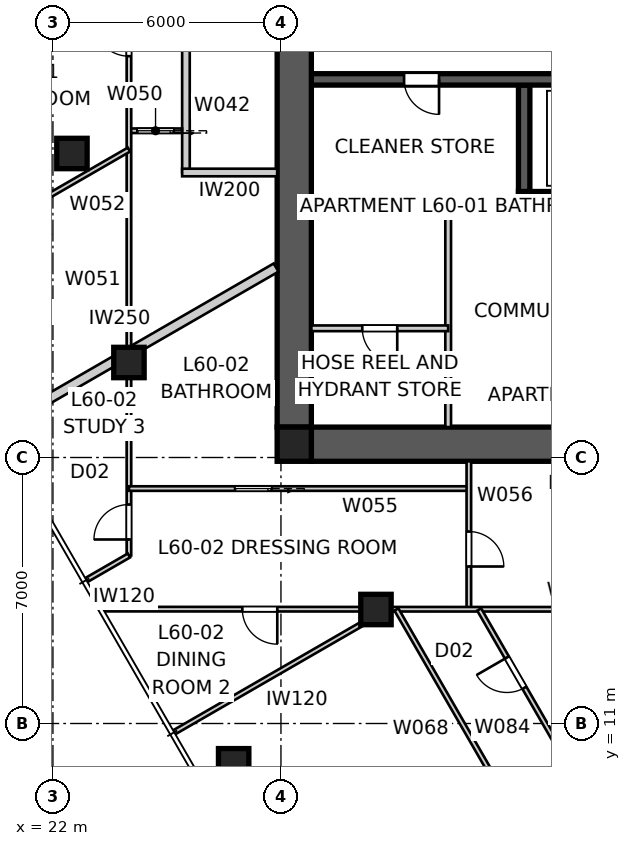
"""IFC4 building model, lengths in metres.
Left out: names, types, materials, properties, quantities, classifications, styles, units other than length and angle.
Written with IfcOpenShell. Run it as: python <this file> out.ifc"""

import sys

from ifc_helpers import new_model, si_unit, direction, frame, frame_2d, origin, origin_2d, place, context, subcontext, project, spatial, polyline, rectangle, outline, extrude, element, fill, save


model = new_model("IFC4")
c1 = context("Model", 3, precision=1e-05, world=origin(), true_north=direction((0.0, 1.0)))
c2 = subcontext(c1, "Body", "Model", "MODEL_VIEW")
j1 = project(units=[si_unit("LENGTHUNIT", "METRE"), si_unit("PLANEANGLEUNIT", "RADIAN")], contexts=[c1])
p1 = place(None, origin())
s1 = spatial("IfcSite", under=j1, at=p1, CompositionType="ELEMENT")
p2 = place(p1, origin())
s2 = spatial("IfcBuilding", under=s1, at=p2, CompositionType="ELEMENT")
p3 = place(p2, frame((0.0, 0.0, 218.4)))
s3 = spatial("IfcBuildingStorey", under=s2, at=p3, CompositionType="ELEMENT", Elevation=218.4)
p4 = place(p3, frame((51.2, 18.35, 0.0), z_axis=(0.0, 0.0, 1.0), x_axis=(-1.0, 0.0, 0.0)))
e1 = element("IfcWall", 1, at=p4, inside=s3, PredefinedType="SHEAR", context=c2, shape_type="SweptSolid", body=[
    extrude(outline(polyline([(0.0, -0.45), (22.4, -0.45), (22.4, -0.025), (22.85, -0.025), (22.85, 0.025), (22.4, 0.025), (22.4, 0.45), (0.0, 0.45), (0.0, 0.025), (-0.45, 0.025), (-0.45, -0.025), (0.0, -0.025), (0.0, -0.45)])), origin(), (0.0, 0.0, 1.0), 3.4),
])
p5 = place(p3, frame((28.35, 41.2, 0.0), z_axis=(0.0, 0.0, 1.0), x_axis=(0.0, -1.0, 0.0)))
e2 = element("IfcWall", 2, at=p5, inside=s3, PredefinedType="SHEAR", context=c2, shape_type="SweptSolid", body=[
    extrude(outline(polyline([(0.0, -0.45), (22.4, -0.45), (22.4, -0.025), (22.85, -0.025), (22.85, 0.025), (22.4, 0.025), (22.4, 0.45), (0.0, 0.45), (0.0, 0.025), (-0.45, 0.025), (-0.45, -0.025), (0.0, -0.025), (0.0, -0.45)])), origin(), (0.0, 0.0, 1.0), 3.4),
])
p6 = place(p5, frame((11.14, 0.0, 0.0)))
e3 = element("IfcOpeningElement", 3, at=p6, cuts=e2, PredefinedType="OPENING", context=c2, shape_type="SweptSolid", body=[
    extrude(rectangle(XDim=1.02, YDim=2.4, at=frame_2d((0.51, 1.2))), frame((0.0, 0.46, 0.0), z_axis=(0.0, -1.0, 0.0), x_axis=(1.0, 0.0, 0.0)), (0.0, 0.0, 1.0), 0.92),
])
p7 = place(p3, frame((51.2, 27.95, 0.0), z_axis=(0.0, 0.0, 1.0), x_axis=(-1.0, 0.0, 0.0)))
e4 = element("IfcWall", 4, at=p7, inside=s3, PredefinedType="SHEAR", context=c2, shape_type="SweptSolid", body=[
    extrude(rectangle(XDim=22.4, YDim=0.3, at=frame_2d((11.2, 0.0))), origin(), (0.0, 0.0, 1.0), 3.4),
])
p8 = place(p7, frame((19.04, 0.0, 0.0)))
e5 = element("IfcOpeningElement", 5, at=p8, cuts=e4, PredefinedType="OPENING", context=c2, shape_type="SweptSolid", body=[
    extrude(rectangle(XDim=0.92, YDim=2.1, at=frame_2d((0.46, 1.05))), frame((0.0, 0.16, 0.0), z_axis=(0.0, -1.0, 0.0), x_axis=(1.0, 0.0, 0.0)), (0.0, 0.0, 1.0), 0.32),
])
p9 = place(p7, frame((1.265, 0.0, 0.0)))
e6 = element("IfcOpeningElement", 6, at=p9, cuts=e4, PredefinedType="OPENING", context=c2, shape_type="SweptSolid", body=[
    extrude(rectangle(XDim=1.02, YDim=2.1, at=frame_2d((0.51, 1.05))), frame((0.0, 0.16, 0.0), z_axis=(0.0, -1.0, 0.0), x_axis=(1.0, 0.0, 0.0)), (0.0, 0.0, 1.0), 0.32),
])
p10 = place(p7, frame((4.015, 0.0, 0.0)))
e7 = element("IfcOpeningElement", 7, at=p10, cuts=e4, PredefinedType="OPENING", context=c2, shape_type="SweptSolid", body=[
    extrude(rectangle(XDim=0.92, YDim=2.1, at=frame_2d((0.46, 1.05))), frame((0.0, 0.16, 0.0), z_axis=(0.0, -1.0, 0.0), x_axis=(1.0, 0.0, 0.0)), (0.0, 0.0, 1.0), 0.32),
])
p11 = place(p7, frame((8.89, 0.0, 0.0)))
e8 = element("IfcOpeningElement", 8, at=p11, cuts=e4, PredefinedType="OPENING", context=c2, shape_type="SweptSolid", body=[
    extrude(rectangle(XDim=0.92, YDim=2.1, at=frame_2d((0.46, 1.05))), frame((0.0, 0.16, 0.0), z_axis=(0.0, -1.0, 0.0), x_axis=(1.0, 0.0, 0.0)), (0.0, 0.0, 1.0), 0.32),
])
p12 = place(p7, frame((6.565, 0.0, 0.0)))
e9 = element("IfcOpeningElement", 9, at=p12, cuts=e4, PredefinedType="OPENING", context=c2, shape_type="SweptSolid", body=[
    extrude(rectangle(XDim=0.92, YDim=2.1, at=frame_2d((0.46, 1.05))), frame((0.0, 0.16, 0.0), z_axis=(0.0, -1.0, 0.0), x_axis=(1.0, 0.0, 0.0)), (0.0, 0.0, 1.0), 0.32),
])
p13 = place(p7, frame((12.05, 0.0, 0.0)))
e10 = element("IfcOpeningElement", 10, at=p13, cuts=e4, PredefinedType="OPENING", context=c2, shape_type="SweptSolid", body=[
    extrude(rectangle(XDim=1.1, YDim=2.1, at=frame_2d((0.55, 1.05))), frame((0.0, 0.16, 0.0), z_axis=(0.0, -1.0, 0.0), x_axis=(1.0, 0.0, 0.0)), (0.0, 0.0, 1.0), 0.32),
])
p14 = place(p7, frame((14.85, 0.0, 0.0)))
e11 = element("IfcOpeningElement", 11, at=p14, cuts=e4, PredefinedType="OPENING", context=c2, shape_type="SweptSolid", body=[
    extrude(rectangle(XDim=1.1, YDim=2.1, at=frame_2d((0.55, 1.05))), frame((0.0, 0.16, 0.0), z_axis=(0.0, -1.0, 0.0), x_axis=(1.0, 0.0, 0.0)), (0.0, 0.0, 1.0), 0.32),
])
p15 = place(p3, frame((45.75, 24.85, 0.0), z_axis=(0.0, 0.0, 1.0), x_axis=(-1.0, 0.0, 0.0)))
e12 = element("IfcWall", 12, at=p15, inside=s3, PredefinedType="SHEAR", context=c2, shape_type="SweptSolid", body=[
    extrude(rectangle(XDim=11.5, YDim=0.3, at=frame_2d((5.75, 0.0))), origin(), (0.0, 0.0, 1.0), 3.4),
])
p16 = place(p3, frame((34.4, 27.8, 0.0), z_axis=(0.0, 0.0, 1.0), x_axis=(0.0, -1.0, 0.0)))
e13 = element("IfcWall", 13, at=p16, inside=s3, PredefinedType="SHEAR", context=c2, shape_type="SweptSolid", body=[
    extrude(rectangle(XDim=2.8, YDim=0.3, at=frame_2d((1.4, 0.0))), origin(), (0.0, 0.0, 1.0), 3.4),
])
p17 = place(p3, frame((28.35, 18.35, 0.0), z_axis=(0.0, 0.0, 1.0), x_axis=(1.0, 0.0, 0.0)))
e14 = element("IfcColumn", 14, at=p17, inside=s3, PredefinedType="COLUMN", context=c2, shape_type="SweptSolid", body=[
    extrude(rectangle(XDim=0.9, YDim=0.9, at=origin_2d()), origin(), (0.0, 0.0, 1.0), 3.4),
])
for number, where, z_axis, x_axis in (
    (15, (26.755, 9.94, 0.0), (0.0, 0.0, 1.0), (1.0, 0.0, 0.0)),
    (16, (22.5, 26.0, 0.0), (0.0, 0.0, 1.0), (1.0, 0.0, 0.0)),
    (17, (24.0, 20.5, 0.0), (0.0, 0.0, 1.0), (1.0, 0.0, 0.0)),
    (18, (30.5, 14.0, 0.0), (0.0, 0.0, 1.0), (1.0, 0.0, 0.0)),
):
    element("IfcColumn", number, at=place(p3, frame(where, z_axis=z_axis, x_axis=x_axis)), inside=s3, PredefinedType="COLUMN", context=c2, shape_type="SweptSolid", body=[
        extrude(rectangle(XDim=0.8, YDim=0.8, at=origin_2d()), origin(), (0.0, 0.0, 1.0), 3.4),
    ])
p18 = place(p3, frame((25.5, 25.5, 0.0), z_axis=(0.0, 0.0, 1.0), x_axis=(0.0, 1.0, 0.0)))
e19 = element("IfcWall", 19, at=p18, inside=s3, PredefinedType="PARTITIONING", context=c2, shape_type="SweptSolid", body=[
    extrude(rectangle(XDim=9.0, YDim=0.2, at=frame_2d((4.5, 0.0))), origin(), (0.0, 0.0, 1.0), 3.25),
])
p19 = place(p18, frame((3.492, 0.0, 0.0)))
e20 = element("IfcOpeningElement", 20, at=p19, cuts=e19, PredefinedType="OPENING", context=c2, shape_type="SweptSolid", body=[
    extrude(rectangle(XDim=1.02, YDim=2.34, at=frame_2d((0.51, 1.17))), frame((0.0, 0.11, 0.0), z_axis=(0.0, -1.0, 0.0), x_axis=(1.0, 0.0, 0.0)), (0.0, 0.0, 1.0), 0.22),
])
p20 = place(p18, frame((7.229, 0.0, 0.0)))
e21 = element("IfcOpeningElement", 21, at=p20, cuts=e19, PredefinedType="OPENING", context=c2, shape_type="SweptSolid", body=[
    extrude(rectangle(XDim=1.02, YDim=2.34, at=frame_2d((0.51, 1.17))), frame((0.0, 0.11, 0.0), z_axis=(0.0, -1.0, 0.0), x_axis=(1.0, 0.0, 0.0)), (0.0, 0.0, 1.0), 0.22),
])
p21 = place(p3, frame((27.9, 25.5, 0.0), z_axis=(0.0, 0.0, 1.0), x_axis=(-1.0, 0.0, 0.0)))
e22 = element("IfcWall", 22, at=p21, inside=s3, PredefinedType="PARTITIONING", context=c2, shape_type="SweptSolid", body=[
    extrude(rectangle(XDim=2.5, YDim=0.2, at=frame_2d((1.25, 0.0))), origin(), (0.0, 0.0, 1.0), 3.25),
])
p22 = place(p3, frame((15.889, 26.761, 0.0), z_axis=(0.0, 0.0, 1.0), x_axis=(0.866024069551, 0.500002310952, 0.0)))
e23 = element("IfcWall", 23, at=p22, inside=s3, PredefinedType="PARTITIONING", context=c2, shape_type="SweptSolid", body=[
    extrude(rectangle(XDim=10.95, YDim=0.25, at=frame_2d((5.475, 0.0))), origin(), (0.0, 0.0, 1.0), 3.25),
])
p23 = place(p3, frame((20.514, 18.75, 0.0), z_axis=(0.0, 0.0, 1.0), x_axis=(0.866020489494, 0.500008511703, 0.0)))
e24 = element("IfcWall", 24, at=p23, inside=s3, PredefinedType="PARTITIONING", context=c2, shape_type="SweptSolid", body=[
    extrude(rectangle(XDim=8.496, YDim=0.25, at=frame_2d((4.248, 0.0))), origin(), (0.0, 0.0, 1.0), 3.25),
])
p24 = place(p3, frame((32.4, 18.8, 0.0), z_axis=(0.0, 0.0, 1.0), x_axis=(0.0, 1.0, 0.0)))
e25 = element("IfcWall", 25, at=p24, inside=s3, PredefinedType="SOLIDWALL", context=c2, shape_type="SweptSolid", body=[
    extrude(rectangle(XDim=5.9, YDim=0.15, at=frame_2d((2.95, 0.0))), origin(), (0.0, 0.0, 1.0), 3.25),
])
p25 = place(p3, frame((32.4, 24.7, 0.0), z_axis=(0.0, 0.0, 1.0), x_axis=(1.0, 0.0, 0.0)))
e26 = element("IfcWall", 26, at=p25, inside=s3, PredefinedType="SOLIDWALL", context=c2, shape_type="SweptSolid", body=[
    extrude(rectangle(XDim=1.85, YDim=0.15, at=frame_2d((0.925, 0.0))), origin(), (0.0, 0.0, 1.0), 3.25),
])
p26 = place(p3, frame((32.4, 21.4, 0.0), z_axis=(0.0, 0.0, 1.0), x_axis=(-1.0, 0.0, 0.0)))
e27 = element("IfcWall", 27, at=p26, inside=s3, PredefinedType="SOLIDWALL", context=c2, shape_type="SweptSolid", body=[
    extrude(rectangle(XDim=3.6, YDim=0.15, at=frame_2d((1.8, 0.0))), origin(), (0.0, 0.0, 1.0), 3.25),
])
p27 = place(p26, frame((1.34, 0.0, 0.0)))
e28 = element("IfcOpeningElement", 28, at=p27, cuts=e27, PredefinedType="OPENING", context=c2, shape_type="SweptSolid", body=[
    extrude(rectangle(XDim=0.92, YDim=2.1, at=frame_2d((0.46, 1.05))), frame((0.0, 0.085, 0.0), z_axis=(0.0, -1.0, 0.0), x_axis=(1.0, 0.0, 0.0)), (0.0, 0.0, 1.0), 0.17),
])
p28 = place(p3, frame((25.4, 26.598, 0.0), z_axis=(0.0, 0.0, 1.0), x_axis=(-1.0, 0.0, 0.0)))
e29 = element("IfcWall", 29, at=p28, inside=s3, PredefinedType="PARTITIONING", context=c2, shape_type="SweptSolid", body=[
    extrude(rectangle(XDim=1.4, YDim=0.12, at=frame_2d((0.7, 0.0))), origin(), (0.0, 0.0, 1.0), 3.25),
])
p29 = place(p28, frame((0.22, 0.0, 0.0)))
e30 = element("IfcOpeningElement", 30, at=p29, cuts=e29, PredefinedType="OPENING", context=c2, shape_type="SweptSolid", body=[
    extrude(rectangle(XDim=0.96, YDim=2.1, at=frame_2d((0.48, 1.05))), frame((0.0, 0.07, 0.0), z_axis=(0.0, -1.0, 0.0), x_axis=(1.0, 0.0, 0.0)), (0.0, 0.0, 1.0), 0.14),
])
p30 = place(p3, frame((24.0, 15.422, 0.0), z_axis=(0.0, 0.0, 1.0), x_axis=(0.0, 1.0, 0.0)))
e31 = element("IfcWall", 31, at=p30, inside=s3, PredefinedType="PARTITIONING", context=c2, shape_type="SweptSolid", body=[
    extrude(rectangle(XDim=26.045, YDim=0.12, at=frame_2d((13.022, 0.0))), origin(), (0.0, 0.0, 1.0), 2.55),
])
p31 = place(p30, frame((13.139, 0.0, 0.0)))
e32 = element("IfcOpeningElement", 32, at=p31, cuts=e31, PredefinedType="OPENING", context=c2, shape_type="SweptSolid", body=[
    extrude(rectangle(XDim=0.92, YDim=2.34, at=frame_2d((0.46, 1.17))), frame((0.0, 0.07, 0.0), z_axis=(0.0, -1.0, 0.0), x_axis=(1.0, 0.0, 0.0)), (0.0, 0.0, 1.0), 0.14),
])
p32 = place(p30, frame((20.573, 0.0, 0.0)))
e33 = element("IfcOpeningElement", 33, at=p32, cuts=e31, PredefinedType="OPENING", context=c2, shape_type="SweptSolid", body=[
    extrude(rectangle(XDim=0.92, YDim=2.34, at=frame_2d((0.46, 1.17))), frame((0.0, 0.07, 0.0), z_axis=(0.0, -1.0, 0.0), x_axis=(1.0, 0.0, 0.0)), (0.0, 0.0, 1.0), 0.14),
])
p33 = place(p30, frame((0.42, 0.0, 0.0)))
e34 = element("IfcOpeningElement", 34, at=p33, cuts=e31, PredefinedType="OPENING", context=c2, shape_type="SweptSolid", body=[
    extrude(rectangle(XDim=0.92, YDim=2.34, at=frame_2d((0.46, 1.17))), frame((0.0, 0.07, 0.0), z_axis=(0.0, -1.0, 0.0), x_axis=(1.0, 0.0, 0.0)), (0.0, 0.0, 1.0), 0.14),
])
p34 = place(p3, frame((24.0, 26.103, 0.0), z_axis=(0.0, 0.0, 1.0), x_axis=(-0.866017585169, -0.500013541994, 0.0)))
e35 = element("IfcWall", 35, at=p34, inside=s3, PredefinedType="PARTITIONING", context=c2, shape_type="SweptSolid", body=[
    extrude(rectangle(XDim=6.655, YDim=0.12, at=frame_2d((3.328, 0.0))), origin(), (0.0, 0.0, 1.0), 3.25),
])
p35 = place(p34, frame((2.887, 0.0, 0.0)))
e36 = element("IfcOpeningElement", 36, at=p35, cuts=e35, PredefinedType="OPENING", context=c2, shape_type="SweptSolid", body=[
    extrude(rectangle(XDim=0.92, YDim=2.34, at=frame_2d((0.46, 1.17))), frame((0.0, 0.07, 0.0), z_axis=(0.0, -1.0, 0.0), x_axis=(1.0, 0.0, 0.0)), (0.0, 0.0, 1.0), 0.14),
])
p36 = place(p3, frame((32.944, 17.183, 0.0), z_axis=(0.0, 0.0, 1.0), x_axis=(-1.0, 0.0, 0.0)))
e37 = element("IfcWall", 37, at=p36, inside=s3, PredefinedType="PARTITIONING", context=c2, shape_type="SweptSolid", body=[
    extrude(rectangle(XDim=8.944, YDim=0.12, at=frame_2d((4.472, 0.0))), origin(), (0.0, 0.0, 1.0), 3.25),
])
p37 = place(p36, frame((5.192, 0.0, 0.0)))
e38 = element("IfcOpeningElement", 38, at=p37, cuts=e37, PredefinedType="OPENING", context=c2, shape_type="SweptSolid", body=[
    extrude(rectangle(XDim=0.96, YDim=2.1, at=frame_2d((0.48, 1.05))), frame((0.0, 0.07, 0.0), z_axis=(0.0, -1.0, 0.0), x_axis=(1.0, 0.0, 0.0)), (0.0, 0.0, 1.0), 0.14),
])
p38 = place(p3, frame((32.944, 17.9, 0.0), z_axis=(0.0, 0.0, 1.0), x_axis=(0.0, -1.0, 0.0)))
e39 = element("IfcWall", 39, at=p38, inside=s3, PredefinedType="PARTITIONING", context=c2, shape_type="SweptSolid", body=[
    extrude(rectangle(XDim=3.9, YDim=0.12, at=frame_2d((1.95, 0.0))), origin(), (0.0, 0.0, 1.0), 3.25),
])
p39 = place(p38, frame((1.849, 0.0, 0.0)))
e40 = element("IfcOpeningElement", 40, at=p39, cuts=e39, PredefinedType="OPENING", context=c2, shape_type="SweptSolid", body=[
    extrude(rectangle(XDim=0.92, YDim=2.34, at=frame_2d((0.46, 1.17))), frame((0.0, 0.07, 0.0), z_axis=(0.0, -1.0, 0.0), x_axis=(1.0, 0.0, 0.0)), (0.0, 0.0, 1.0), 0.14),
])
p40 = place(p3, frame((51.757, 14.0, 0.0), z_axis=(0.0, 0.0, 1.0), x_axis=(-0.999999938148, 0.000351716958, 0.0)))
e41 = element("IfcWall", 41, at=p40, inside=s3, PredefinedType="PARTITIONING", context=c2, shape_type="SweptSolid", body=[
    extrude(rectangle(XDim=28.46, YDim=0.12, at=frame_2d((14.23, 0.0))), origin(), (0.0, 0.0, 1.0), 2.55),
])
p41 = place(p40, frame((3.82, 0.0, 0.0)))
e42 = element("IfcOpeningElement", 42, at=p41, cuts=e41, PredefinedType="OPENING", context=c2, shape_type="SweptSolid", body=[
    extrude(rectangle(XDim=0.92, YDim=2.34, at=frame_2d((0.46, 1.17))), frame((0.0, 0.07, 0.0), z_axis=(0.0, -1.0, 0.0), x_axis=(1.0, 0.0, 0.0)), (0.0, 0.0, 1.0), 0.14),
])
p42 = place(p40, frame((9.17, 0.0, 0.0)))
e43 = element("IfcOpeningElement", 43, at=p42, cuts=e41, PredefinedType="OPENING", context=c2, shape_type="SweptSolid", body=[
    extrude(rectangle(XDim=0.96, YDim=2.1, at=frame_2d((0.48, 1.05))), frame((0.0, 0.07, 0.0), z_axis=(0.0, -1.0, 0.0), x_axis=(1.0, 0.0, 0.0)), (0.0, 0.0, 1.0), 0.14),
])
p43 = place(p40, frame((13.68, 0.0, 0.0)))
e44 = element("IfcOpeningElement", 44, at=p43, cuts=e41, PredefinedType="OPENING", context=c2, shape_type="SweptSolid", body=[
    extrude(rectangle(XDim=0.96, YDim=2.1, at=frame_2d((0.48, 1.05))), frame((0.0, 0.07, 0.0), z_axis=(0.0, -1.0, 0.0), x_axis=(1.0, 0.0, 0.0)), (0.0, 0.0, 1.0), 0.14),
])
p44 = place(p40, frame((23.854, 0.0, 0.0)))
e45 = element("IfcOpeningElement", 45, at=p44, cuts=e41, PredefinedType="OPENING", context=c2, shape_type="SweptSolid", body=[
    extrude(rectangle(XDim=0.92, YDim=2.34, at=frame_2d((0.46, 1.17))), frame((0.0, 0.07, 0.0), z_axis=(0.0, -1.0, 0.0), x_axis=(1.0, 0.0, 0.0)), (0.0, 0.0, 1.0), 0.14),
])
p45 = place(p3, frame((22.862, 14.765, 0.0), z_axis=(0.0, 0.0, 1.0), x_axis=(0.866040225545, 0.499974327079, 0.0)))
e46 = element("IfcWall", 46, at=p45, inside=s3, PredefinedType="PARTITIONING", context=c2, shape_type="SweptSolid", body=[
    extrude(rectangle(XDim=1.314, YDim=0.12, at=frame_2d((0.657, 0.0))), origin(), (0.0, 0.0, 1.0), 3.25),
])
p46 = place(p3, frame((31.039, 14.0, 0.0), z_axis=(0.0, 0.0, 1.0), x_axis=(0.500006184843, -0.866021832934, 0.0)))
e47 = element("IfcWall", 47, at=p46, inside=s3, PredefinedType="PARTITIONING", context=c2, shape_type="SweptSolid", body=[
    extrude(rectangle(XDim=13.084, YDim=0.12, at=frame_2d((6.542, 0.0))), origin(), (0.0, 0.0, 1.0), 3.25),
])
p47 = place(p46, frame((6.102, 0.0, 0.0)))
e48 = element("IfcOpeningElement", 48, at=p47, cuts=e47, PredefinedType="OPENING", context=c2, shape_type="SweptSolid", body=[
    extrude(rectangle(XDim=0.92, YDim=2.34, at=frame_2d((0.46, 1.17))), frame((0.0, 0.07, 0.0), z_axis=(0.0, -1.0, 0.0), x_axis=(1.0, 0.0, 0.0)), (0.0, 0.0, 1.0), 0.14),
])
p48 = place(p3, frame((25.174, 10.759, 0.0), z_axis=(0.0, 0.0, 1.0), x_axis=(0.866023120914, 0.500003954026, 0.0)))
e49 = element("IfcWall", 49, at=p48, inside=s3, PredefinedType="PARTITIONING", context=c2, shape_type="SweptSolid", body=[
    extrude(rectangle(XDim=6.481, YDim=0.12, at=frame_2d((3.241, 0.0))), origin(), (0.0, 0.0, 1.0), 3.25),
])
p49 = place(p3, frame((35.435, 10.156, 0.0), z_axis=(0.0, 0.0, 1.0), x_axis=(-0.499966886051, 0.866044521288, 0.0)))
e50 = element("IfcWall", 50, at=p49, inside=s3, PredefinedType="PARTITIONING", context=c2, shape_type="SweptSolid", body=[
    extrude(rectangle(XDim=4.438, YDim=0.12, at=frame_2d((2.219, 0.0))), origin(), (0.0, 0.0, 1.0), 3.25),
])
p50 = place(p49, frame((2.059, 0.0, 0.0)))
e51 = element("IfcOpeningElement", 51, at=p50, cuts=e50, PredefinedType="OPENING", context=c2, shape_type="SweptSolid", body=[
    extrude(rectangle(XDim=0.92, YDim=2.34, at=frame_2d((0.46, 1.17))), frame((0.0, 0.07, 0.0), z_axis=(0.0, -1.0, 0.0), x_axis=(1.0, 0.0, 0.0)), (0.0, 0.0, 1.0), 0.14),
])
p51 = place(p8, origin())
e52 = element("IfcDoor", 52, at=p51, inside=s3, OperationType="SINGLE_SWING_LEFT", PredefinedType="DOOR", context=c2, shape_type="SweptSolid", body=[
    extrude(rectangle(XDim=0.92, YDim=2.1, at=frame_2d((0.46, 1.05))), frame((0.0, 0.025, 0.0), z_axis=(0.0, -1.0, 0.0), x_axis=(1.0, 0.0, 0.0)), (0.0, 0.0, 1.0), 0.05),
])
fill(e5, e52)
p52 = place(p27, origin())
e53 = element("IfcDoor", 53, at=p52, inside=s3, OperationType="SINGLE_SWING_LEFT", PredefinedType="DOOR", context=c2, shape_type="SweptSolid", body=[
    extrude(rectangle(XDim=0.92, YDim=2.1, at=frame_2d((0.46, 1.05))), frame((0.0, 0.025, 0.0), z_axis=(0.0, -1.0, 0.0), x_axis=(1.0, 0.0, 0.0)), (0.0, 0.0, 1.0), 0.05),
])
fill(e28, e53)
p53 = place(p31, origin())
e54 = element("IfcDoor", 54, at=p53, inside=s3, OperationType="SINGLE_SWING_RIGHT", PredefinedType="DOOR", context=c2, shape_type="SweptSolid", body=[
    extrude(rectangle(XDim=0.92, YDim=2.34, at=frame_2d((0.46, 1.17))), frame((0.0, 0.025, 0.0), z_axis=(0.0, -1.0, 0.0), x_axis=(1.0, 0.0, 0.0)), (0.0, 0.0, 1.0), 0.05),
])
fill(e32, e54)
p54 = place(p29, origin())
e55 = element("IfcDoor", 55, at=p54, inside=s3, OperationType="SLIDING_TO_LEFT", PredefinedType="DOOR", context=c2, shape_type="SweptSolid", body=[
    extrude(rectangle(XDim=0.96, YDim=2.1, at=frame_2d((0.48, 1.05))), frame((0.0, 0.025, 0.0), z_axis=(0.0, -1.0, 0.0), x_axis=(1.0, 0.0, 0.0)), (0.0, 0.0, 1.0), 0.05),
])
fill(e30, e55)
p55 = place(p39, origin())
e56 = element("IfcDoor", 56, at=p55, inside=s3, OperationType="SINGLE_SWING_RIGHT", PredefinedType="DOOR", context=c2, shape_type="SweptSolid", body=[
    extrude(rectangle(XDim=0.92, YDim=2.34, at=frame_2d((0.46, 1.17))), frame((0.0, 0.025, 0.0), z_axis=(0.0, -1.0, 0.0), x_axis=(1.0, 0.0, 0.0)), (0.0, 0.0, 1.0), 0.05),
])
fill(e40, e56)
p56 = place(p50, origin())
e57 = element("IfcDoor", 57, at=p56, inside=s3, OperationType="SINGLE_SWING_RIGHT", PredefinedType="DOOR", context=c2, shape_type="SweptSolid", body=[
    extrude(rectangle(XDim=0.92, YDim=2.34, at=frame_2d((0.46, 1.17))), frame((0.0, 0.025, 0.0), z_axis=(0.0, -1.0, 0.0), x_axis=(1.0, 0.0, 0.0)), (0.0, 0.0, 1.0), 0.05),
])
fill(e51, e57)
p57 = place(p37, origin())
e58 = element("IfcDoor", 58, at=p57, inside=s3, OperationType="SLIDING_TO_LEFT", PredefinedType="DOOR", context=c2, shape_type="SweptSolid", body=[
    extrude(rectangle(XDim=0.96, YDim=2.1, at=frame_2d((0.48, 1.05))), frame((0.0, 0.025, 0.0), z_axis=(0.0, -1.0, 0.0), x_axis=(1.0, 0.0, 0.0)), (0.0, 0.0, 1.0), 0.05),
])
fill(e38, e58)
p58 = place(p44, origin())
e59 = element("IfcDoor", 59, at=p58, inside=s3, OperationType="SINGLE_SWING_LEFT", PredefinedType="DOOR", context=c2, shape_type="SweptSolid", body=[
    extrude(rectangle(XDim=0.92, YDim=2.34, at=frame_2d((0.46, 1.17))), frame((0.0, 0.025, 0.0), z_axis=(0.0, -1.0, 0.0), x_axis=(1.0, 0.0, 0.0)), (0.0, 0.0, 1.0), 0.05),
])
fill(e45, e59)
p59 = place(p33, origin())
e60 = element("IfcDoor", 60, at=p59, inside=s3, OperationType="SINGLE_SWING_LEFT", PredefinedType="DOOR", context=c2, shape_type="SweptSolid", body=[
    extrude(rectangle(XDim=0.92, YDim=2.34, at=frame_2d((0.46, 1.17))), frame((0.0, 0.025, 0.0), z_axis=(0.0, -1.0, 0.0), x_axis=(1.0, 0.0, 0.0)), (0.0, 0.0, 1.0), 0.05),
])
fill(e34, e60)
save(model, sys.argv[1])
